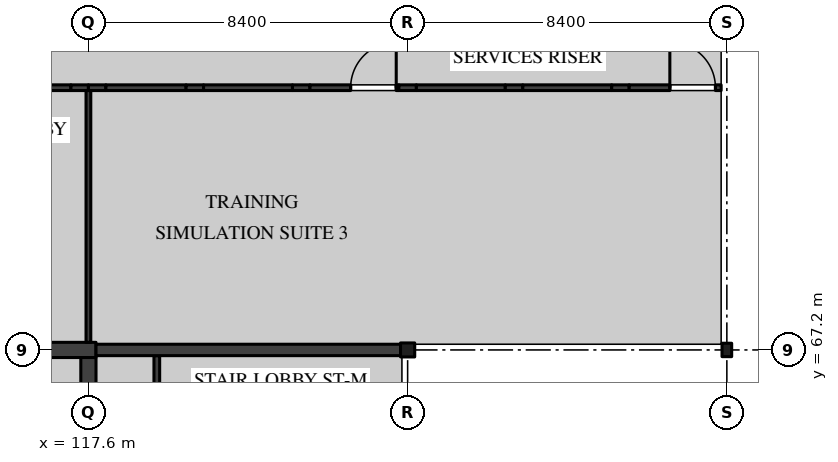
"""IFC4 building model, lengths in metres.
Left out: names, types, materials, properties, quantities, classifications, styles, units other than length and angle.
Written with IfcOpenShell. Run it as: python <this file> out.ifc"""

import sys

from ifc_helpers import new_model, si_unit, direction, frame, frame_2d, origin, origin_2d, place, context, subcontext, project, spatial, rectangle, i_section, extrude, element, fill, save


model = new_model("IFC4")
c1 = context("Model", 3, precision=1e-05, world=origin(), true_north=direction((0.0, 1.0)))
c2 = subcontext(c1, "Body", "Model", "MODEL_VIEW")
j1 = project(units=[si_unit("LENGTHUNIT", "METRE"), si_unit("PLANEANGLEUNIT", "RADIAN")], contexts=[c1])
p1 = place(None, origin())
s1 = spatial("IfcSite", under=j1, at=p1, CompositionType="ELEMENT")
p2 = place(p1, origin())
s2 = spatial("IfcBuilding", under=s1, at=p2, CompositionType="ELEMENT")
p3 = place(p2, frame((0.0, 0.0, 18.9)))
s3 = spatial("IfcBuildingStorey", under=s2, at=p3, CompositionType="ELEMENT", Elevation=18.9)
p4 = place(p3, frame((126.0, 67.2, 0.0), z_axis=(0.0, 0.0, 1.0), x_axis=(1.0, 0.0, 0.0)))
e1 = element("IfcColumn", 1, at=p4, inside=s3, PredefinedType="COLUMN", context=c2, shape_type="SweptSolid", body=[
    extrude(i_section(OverallWidth=0.373, OverallDepth=0.368, WebThickness=0.015, FlangeThickness=0.024, FilletRadius=0.015, at=origin_2d()), origin(), (0.0, 0.0, 1.0), 4.37),
])
p5 = place(p3, frame((134.4, 67.2, 0.0), z_axis=(0.0, 0.0, 1.0), x_axis=(1.0, 0.0, 0.0)))
e2 = element("IfcColumn", 2, at=p5, inside=s3, PredefinedType="COLUMN", context=c2, shape_type="SweptSolid", body=[
    extrude(i_section(OverallWidth=0.254, OverallDepth=0.353, WebThickness=0.01, FlangeThickness=0.016, FilletRadius=0.015, at=origin_2d()), origin(), (0.0, 0.0, 1.0), 4.37),
])
p6 = place(p3, frame((109.0, 67.2, 0.0), z_axis=(0.0, 0.0, 1.0), x_axis=(1.0, 0.0, 0.0)))
e3 = element("IfcWall", 3, at=p6, inside=s3, PredefinedType="SHEAR", context=c2, shape_type="SweptSolid", body=[
    extrude(rectangle(XDim=8.8, YDim=0.4, at=frame_2d((4.4, 0.0))), origin(), (0.0, 0.0, 1.0), 4.37),
])
p7 = place(p3, frame((117.6, 59.0, 0.0), z_axis=(0.0, 0.0, 1.0), x_axis=(0.0, 1.0, 0.0)))
e4 = element("IfcWall", 4, at=p7, inside=s3, PredefinedType="SHEAR", context=c2, shape_type="SweptSolid", body=[
    extrude(rectangle(XDim=8.0, YDim=0.4, at=frame_2d((4.0, 0.0))), origin(), (0.0, 0.0, 1.0), 4.37),
])
p8 = place(p7, frame((2.925, 0.0, 0.0)))
e5 = element("IfcOpeningElement", 5, at=p8, cuts=e4, PredefinedType="OPENING", context=c2, shape_type="SweptSolid", body=[
    extrude(rectangle(XDim=1.2, YDim=2.1, at=frame_2d((0.6, 1.05))), frame((0.0, 0.21, 0.0), z_axis=(0.0, -1.0, 0.0), x_axis=(1.0, 0.0, 0.0)), (0.0, 0.0, 1.0), 0.42),
])
p9 = place(p3, frame((119.4, 63.0, 0.0), z_axis=(0.0, 0.0, 1.0), x_axis=(0.0, 1.0, 0.0)))
e6 = element("IfcWall", 6, at=p9, inside=s3, PredefinedType="PARTITIONING", context=c2, shape_type="SweptSolid", body=[
    extrude(rectangle(XDim=4.05, YDim=0.15, at=frame_2d((2.025, 0.0))), origin(), (0.0, 0.0, 1.0), 4.37),
])
p10 = place(p9, frame((1.35, 0.0, 0.0)))
e7 = element("IfcOpeningElement", 7, at=p10, cuts=e6, PredefinedType="OPENING", context=c2, shape_type="SweptSolid", body=[
    extrude(rectangle(XDim=0.9, YDim=2.1, at=frame_2d((0.45, 1.05))), frame((0.0, 0.085, 0.0), z_axis=(0.0, -1.0, 0.0), x_axis=(1.0, 0.0, 0.0)), (0.0, 0.0, 1.0), 0.17),
])
p11 = place(p3, frame((115.03, 74.1, 0.0), z_axis=(0.0, 0.0, 1.0), x_axis=(1.0, 0.0, 0.0)))
e8 = element("IfcWall", 8, at=p11, inside=s3, PredefinedType="PARTITIONING", context=c2, shape_type="SweptSolid", body=[
    extrude(rectangle(XDim=2.11, YDim=0.15, at=frame_2d((1.055, 0.0))), origin(), (0.0, 0.0, 1.0), 4.37),
])
p12 = place(p3, frame((117.14, 74.1, 0.0), z_axis=(0.0, 0.0, 1.0), x_axis=(1.0, 0.0, 0.0)))
e9 = element("IfcWall", 9, at=p12, inside=s3, PredefinedType="PARTITIONING", context=c2, shape_type="SweptSolid", body=[
    extrude(rectangle(XDim=0.46, YDim=0.15, at=frame_2d((0.23, 0.0))), origin(), (0.0, 0.0, 1.0), 3.819),
])
p13 = place(p3, frame((117.6, 74.1, 0.0), z_axis=(0.0, 0.0, 1.0), x_axis=(1.0, 0.0, 0.0)))
e10 = element("IfcWall", 10, at=p13, inside=s3, PredefinedType="PARTITIONING", context=c2, shape_type="SweptSolid", body=[
    extrude(rectangle(XDim=0.46, YDim=0.15, at=frame_2d((0.23, 0.0))), origin(), (0.0, 0.0, 1.0), 3.819),
])
p14 = place(p3, frame((118.06, 74.1, 0.0), z_axis=(0.0, 0.0, 1.0), x_axis=(1.0, 0.0, 0.0)))
e11 = element("IfcWall", 11, at=p14, inside=s3, PredefinedType="PARTITIONING", context=c2, shape_type="SweptSolid", body=[
    extrude(rectangle(XDim=2.11, YDim=0.15, at=frame_2d((1.055, 0.0))), origin(), (0.0, 0.0, 1.0), 4.37),
])
p15 = place(p3, frame((120.17, 74.1, 0.0), z_axis=(0.0, 0.0, 1.0), x_axis=(1.0, 0.0, 0.0)))
e12 = element("IfcWall", 12, at=p15, inside=s3, PredefinedType="PARTITIONING", context=c2, shape_type="SweptSolid", body=[
    extrude(rectangle(XDim=0.46, YDim=0.15, at=frame_2d((0.23, 0.0))), origin(), (0.0, 0.0, 1.0), 3.946),
])
p16 = place(p3, frame((120.63, 74.1, 0.0), z_axis=(0.0, 0.0, 1.0), x_axis=(1.0, 0.0, 0.0)))
e13 = element("IfcWall", 13, at=p16, inside=s3, PredefinedType="PARTITIONING", context=c2, shape_type="SweptSolid", body=[
    extrude(rectangle(XDim=2.34, YDim=0.15, at=frame_2d((1.17, 0.0))), origin(), (0.0, 0.0, 1.0), 4.37),
])
p17 = place(p3, frame((122.97, 74.1, 0.0), z_axis=(0.0, 0.0, 1.0), x_axis=(1.0, 0.0, 0.0)))
e14 = element("IfcWall", 14, at=p17, inside=s3, PredefinedType="PARTITIONING", context=c2, shape_type="SweptSolid", body=[
    extrude(rectangle(XDim=0.46, YDim=0.15, at=frame_2d((0.23, 0.0))), origin(), (0.0, 0.0, 1.0), 3.946),
])
p18 = place(p3, frame((123.43, 74.1, 0.0), z_axis=(0.0, 0.0, 1.0), x_axis=(1.0, 0.0, 0.0)))
e15 = element("IfcWall", 15, at=p18, inside=s3, PredefinedType="PARTITIONING", context=c2, shape_type="SweptSolid", body=[
    extrude(rectangle(XDim=2.34, YDim=0.15, at=frame_2d((1.17, 0.0))), origin(), (0.0, 0.0, 1.0), 4.37),
])
p19 = place(p18, frame((1.07, 0.0, 0.0)))
e16 = element("IfcOpeningElement", 16, at=p19, cuts=e15, PredefinedType="OPENING", context=c2, shape_type="SweptSolid", body=[
    extrude(rectangle(XDim=1.2, YDim=2.4, at=frame_2d((0.6, 1.2))), frame((0.0, 0.085, 0.0), z_axis=(0.0, -1.0, 0.0), x_axis=(1.0, 0.0, 0.0)), (0.0, 0.0, 1.0), 0.17),
])
p20 = place(p3, frame((125.77, 74.1, 0.0), z_axis=(0.0, 0.0, 1.0), x_axis=(1.0, 0.0, 0.0)))
e17 = element("IfcWall", 17, at=p20, inside=s3, PredefinedType="PARTITIONING", context=c2, shape_type="SweptSolid", body=[
    extrude(rectangle(XDim=0.46, YDim=0.15, at=frame_2d((0.23, 0.0))), origin(), (0.0, 0.0, 1.0), 3.819),
])
p21 = place(p3, frame((126.23, 74.1, 0.0), z_axis=(0.0, 0.0, 1.0), x_axis=(1.0, 0.0, 0.0)))
e18 = element("IfcWall", 18, at=p21, inside=s3, PredefinedType="PARTITIONING", context=c2, shape_type="SweptSolid", body=[
    extrude(rectangle(XDim=2.34, YDim=0.15, at=frame_2d((1.17, 0.0))), origin(), (0.0, 0.0, 1.0), 4.37),
])
p22 = place(p3, frame((128.57, 74.1, 0.0), z_axis=(0.0, 0.0, 1.0), x_axis=(1.0, 0.0, 0.0)))
e19 = element("IfcWall", 19, at=p22, inside=s3, PredefinedType="PARTITIONING", context=c2, shape_type="SweptSolid", body=[
    extrude(rectangle(XDim=0.46, YDim=0.15, at=frame_2d((0.23, 0.0))), origin(), (0.0, 0.0, 1.0), 3.946),
])
p23 = place(p3, frame((129.03, 74.1, 0.0), z_axis=(0.0, 0.0, 1.0), x_axis=(1.0, 0.0, 0.0)))
e20 = element("IfcWall", 20, at=p23, inside=s3, PredefinedType="PARTITIONING", context=c2, shape_type="SweptSolid", body=[
    extrude(rectangle(XDim=2.34, YDim=0.15, at=frame_2d((1.17, 0.0))), origin(), (0.0, 0.0, 1.0), 4.37),
])
p24 = place(p3, frame((131.37, 74.1, 0.0), z_axis=(0.0, 0.0, 1.0), x_axis=(1.0, 0.0, 0.0)))
e21 = element("IfcWall", 21, at=p24, inside=s3, PredefinedType="PARTITIONING", context=c2, shape_type="SweptSolid", body=[
    extrude(rectangle(XDim=0.46, YDim=0.15, at=frame_2d((0.23, 0.0))), origin(), (0.0, 0.0, 1.0), 3.946),
])
p25 = place(p3, frame((131.83, 74.1, 0.0), z_axis=(0.0, 0.0, 1.0), x_axis=(1.0, 0.0, 0.0)))
e22 = element("IfcWall", 22, at=p25, inside=s3, PredefinedType="PARTITIONING", context=c2, shape_type="SweptSolid", body=[
    extrude(rectangle(XDim=2.42, YDim=0.15, at=frame_2d((1.21, 0.0))), origin(), (0.0, 0.0, 1.0), 4.37),
])
p26 = place(p25, frame((1.07, 0.0, 0.0)))
e23 = element("IfcOpeningElement", 23, at=p26, cuts=e22, PredefinedType="OPENING", context=c2, shape_type="SweptSolid", body=[
    extrude(rectangle(XDim=1.2, YDim=2.4, at=frame_2d((0.6, 1.2))), frame((0.0, 0.085, 0.0), z_axis=(0.0, -1.0, 0.0), x_axis=(1.0, 0.0, 0.0)), (0.0, 0.0, 1.0), 0.17),
])
p27 = place(p3, frame((117.6, 67.4, 0.0), z_axis=(0.0, 0.0, 1.0), x_axis=(0.0, 1.0, 0.0)))
e24 = element("IfcWall", 24, at=p27, inside=s3, PredefinedType="PARTITIONING", context=c2, shape_type="SweptSolid", body=[
    extrude(rectangle(XDim=6.625, YDim=0.125, at=frame_2d((3.312, 0.0))), origin(), (0.0, 0.0, 1.0), 3.819),
])
p28 = place(p3, frame((125.997, 67.2, 0.0), z_axis=(0.0, 0.0, 1.0), x_axis=(-1.0, 0.0, 0.0)))
e25 = element("IfcWall", 25, at=p28, inside=s3, PredefinedType="SOLIDWALL", context=c2, shape_type="SweptSolid", body=[
    extrude(rectangle(XDim=8.197, YDim=0.3, at=frame_2d((4.099, 0.0))), origin(), (0.0, 0.0, 1.0), 3.746),
])
p29 = place(p19, origin())
e26 = element("IfcDoor", 26, at=p29, inside=s3, OperationType="SINGLE_SWING_LEFT", PredefinedType="DOOR", context=c2, shape_type="SweptSolid", body=[
    extrude(rectangle(XDim=1.2, YDim=2.4, at=frame_2d((0.6, 1.2))), frame((0.0, 0.025, 0.0), z_axis=(0.0, -1.0, 0.0), x_axis=(1.0, 0.0, 0.0)), (0.0, 0.0, 1.0), 0.05),
])
fill(e16, e26)
p30 = place(p26, origin())
e27 = element("IfcDoor", 27, at=p30, inside=s3, OperationType="SINGLE_SWING_RIGHT", PredefinedType="DOOR", context=c2, shape_type="SweptSolid", body=[
    extrude(rectangle(XDim=1.2, YDim=2.4, at=frame_2d((0.6, 1.2))), frame((0.0, 0.025, 0.0), z_axis=(0.0, -1.0, 0.0), x_axis=(1.0, 0.0, 0.0)), (0.0, 0.0, 1.0), 0.05),
])
fill(e23, e27)
save(model, sys.argv[1])
